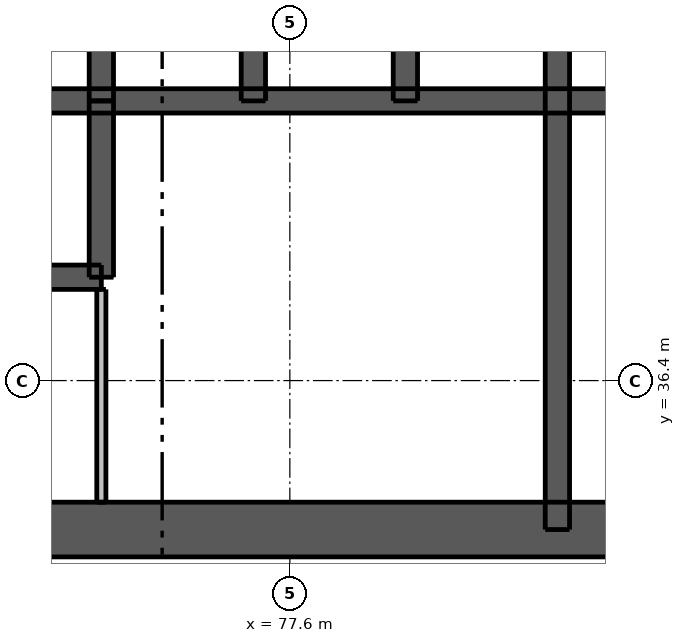
"""IFC4 building model, lengths in metres.
Left out: names, types, materials, properties, quantities, classifications, styles, units other than length and angle.
Written with IfcOpenShell. Run it as: python <this file> out.ifc"""

import sys

from ifc_helpers import new_model, si_unit, direction, frame, frame_2d, origin, place, context, subcontext, project, spatial, rectangle, extrude, element, fill, save


model = new_model("IFC4")
c1 = context("Model", 3, precision=1e-05, world=origin(), true_north=direction((0.0, 1.0)))
c2 = subcontext(c1, "Body", "Model", "MODEL_VIEW")
j1 = project(units=[si_unit("LENGTHUNIT", "METRE"), si_unit("PLANEANGLEUNIT", "RADIAN")], contexts=[c1])
p1 = place(None, origin())
s1 = spatial("IfcSite", under=j1, at=p1, CompositionType="ELEMENT")
p2 = place(p1, origin())
s2 = spatial("IfcBuilding", under=s1, at=p2, CompositionType="ELEMENT")
p3 = place(p2, frame((0.0, 0.0, 66.4)))
s3 = spatial("IfcBuildingStorey", under=s2, at=p3, CompositionType="ELEMENT", Elevation=66.4)
p4 = place(p3, frame((62.5, 33.95, 0.0), z_axis=(0.0, 0.0, 1.0), x_axis=(1.0, 0.0, 0.0)))
e1 = element("IfcWall", 1, at=p4, inside=s3, PredefinedType="SHEAR", context=c2, shape_type="SweptSolid", body=[
    extrude(rectangle(XDim=24.0, YDim=0.9, at=frame_2d((12.0, 0.0))), origin(), (0.0, 0.0, 1.0), 2.95),
])
p5 = place(p4, frame((2.05, 0.0, 0.0)))
e2 = element("IfcOpeningElement", 2, at=p5, cuts=e1, PredefinedType="OPENING", context=c2, shape_type="SweptSolid", body=[
    extrude(rectangle(XDim=1.1, YDim=2.1, at=frame_2d((0.55, 1.05))), frame((0.0, 0.46, 0.0), z_axis=(0.0, -1.0, 0.0), x_axis=(1.0, 0.0, 0.0)), (0.0, 0.0, 1.0), 0.92),
])
p6 = place(p4, frame((20.85, 0.0, 0.0)))
e3 = element("IfcOpeningElement", 3, at=p6, cuts=e1, PredefinedType="OPENING", context=c2, shape_type="SweptSolid", body=[
    extrude(rectangle(XDim=1.1, YDim=2.1, at=frame_2d((0.55, 1.05))), frame((0.0, 0.46, 0.0), z_axis=(0.0, -1.0, 0.0), x_axis=(1.0, 0.0, 0.0)), (0.0, 0.0, 1.0), 0.92),
])
p7 = place(p4, frame((8.0, 0.0, 0.0)))
e4 = element("IfcOpeningElement", 4, at=p7, cuts=e1, PredefinedType="OPENING", context=c2, shape_type="SweptSolid", body=[
    extrude(rectangle(XDim=1.1, YDim=2.1, at=frame_2d((0.55, 1.05))), frame((0.0, 0.46, 0.0), z_axis=(0.0, -1.0, 0.0), x_axis=(1.0, 0.0, 0.0)), (0.0, 0.0, 1.0), 0.92),
])
p8 = place(p4, frame((15.3, 0.0, 0.0)))
e5 = element("IfcOpeningElement", 5, at=p8, cuts=e1, PredefinedType="OPENING", context=c2, shape_type="SweptSolid", body=[
    extrude(rectangle(XDim=0.9, YDim=2.1, at=frame_2d((0.45, 1.05))), frame((0.0, 0.46, 0.0), z_axis=(0.0, -1.0, 0.0), x_axis=(1.0, 0.0, 0.0)), (0.0, 0.0, 1.0), 0.92),
])
p9 = place(p3, frame((62.95, 41.0, 0.0), z_axis=(0.0, 0.0, 1.0), x_axis=(1.0, 0.0, 0.0)))
e6 = element("IfcWall", 6, at=p9, inside=s3, PredefinedType="SHEAR", context=c2, shape_type="SweptSolid", body=[
    extrude(rectangle(XDim=23.1, YDim=0.4, at=frame_2d((11.55, 0.0))), origin(), (0.0, 0.0, 1.0), 2.95),
])
p10 = place(p3, frame((82.0, 33.95, 0.0), z_axis=(0.0, 0.0, 1.0), x_axis=(0.0, 1.0, 0.0)))
e7 = element("IfcWall", 7, at=p10, inside=s3, PredefinedType="SHEAR", context=c2, shape_type="SweptSolid", body=[
    extrude(rectangle(XDim=9.95, YDim=0.4, at=frame_2d((4.975, 0.0))), origin(), (0.0, 0.0, 1.0), 2.95),
])
for number, where, z_axis, x_axis in (
    (8, (74.5, 41.0, 0.0), (0.0, 0.0, 1.0), (0.0, 1.0, 0.0)),
    (9, (77.0, 41.0, 0.0), (0.0, 0.0, 1.0), (0.0, 1.0, 0.0)),
    (10, (79.5, 41.0, 0.0), (0.0, 0.0, 1.0), (0.0, 1.0, 0.0)),
):
    element("IfcWall", number, at=place(p3, frame(where, z_axis=z_axis, x_axis=x_axis)), inside=s3, PredefinedType="SHEAR", context=c2, shape_type="SweptSolid", body=[
        extrude(rectangle(XDim=2.9, YDim=0.4, at=frame_2d((1.45, 0.0))), origin(), (0.0, 0.0, 1.0), 2.95),
    ])
p11 = place(p3, frame((67.0, 38.1, 0.0), z_axis=(0.0, 0.0, 1.0), x_axis=(1.0, 0.0, 0.0)))
e11 = element("IfcWall", 11, at=p11, inside=s3, PredefinedType="SHEAR", context=c2, shape_type="SweptSolid", body=[
    extrude(rectangle(XDim=7.5, YDim=0.4, at=frame_2d((3.75, 0.0))), origin(), (0.0, 0.0, 1.0), 2.95),
])
p12 = place(p11, frame((0.7, 0.0, 0.0)))
e12 = element("IfcOpeningElement", 12, at=p12, cuts=e11, PredefinedType="OPENING", context=c2, shape_type="SweptSolid", body=[
    extrude(rectangle(XDim=1.1, YDim=2.1, at=frame_2d((0.55, 1.05))), frame((0.0, 0.21, 0.0), z_axis=(0.0, -1.0, 0.0), x_axis=(1.0, 0.0, 0.0)), (0.0, 0.0, 1.0), 0.42),
])
p13 = place(p11, frame((3.2, 0.0, 0.0)))
e13 = element("IfcOpeningElement", 13, at=p13, cuts=e11, PredefinedType="OPENING", context=c2, shape_type="SweptSolid", body=[
    extrude(rectangle(XDim=1.1, YDim=2.1, at=frame_2d((0.55, 1.05))), frame((0.0, 0.21, 0.0), z_axis=(0.0, -1.0, 0.0), x_axis=(1.0, 0.0, 0.0)), (0.0, 0.0, 1.0), 0.42),
])
p14 = place(p11, frame((5.65, 0.0, 0.0)))
e14 = element("IfcOpeningElement", 14, at=p14, cuts=e11, PredefinedType="OPENING", context=c2, shape_type="SweptSolid", body=[
    extrude(rectangle(XDim=1.2, YDim=2.1, at=frame_2d((0.6, 1.05))), frame((0.0, 0.21, 0.0), z_axis=(0.0, -1.0, 0.0), x_axis=(1.0, 0.0, 0.0)), (0.0, 0.0, 1.0), 0.42),
])
p15 = place(p3, frame((74.5, 38.1, 0.0), z_axis=(0.0, 0.0, 1.0), x_axis=(0.0, 1.0, 0.0)))
e15 = element("IfcWall", 15, at=p15, inside=s3, PredefinedType="SHEAR", context=c2, shape_type="SweptSolid", body=[
    extrude(rectangle(XDim=2.9, YDim=0.4, at=frame_2d((1.45, 0.0))), origin(), (0.0, 0.0, 1.0), 2.95),
])
p16 = place(p3, frame((74.5, 34.4, 0.0), z_axis=(0.0, 0.0, 1.0), x_axis=(0.0, 1.0, 0.0)))
e16 = element("IfcWall", 16, at=p16, inside=s3, PredefinedType="PLUMBINGWALL", context=c2, shape_type="SweptSolid", body=[
    extrude(rectangle(XDim=3.5, YDim=0.15, at=frame_2d((1.75, 0.0))), origin(), (0.0, 0.0, 1.0), 2.95),
])
p17 = place(p8, origin())
e17 = element("IfcDoor", 17, at=p17, inside=s3, OperationType="SINGLE_SWING_LEFT", PredefinedType="DOOR", context=c2, shape_type="SweptSolid", body=[
    extrude(rectangle(XDim=0.9, YDim=2.1, at=frame_2d((0.45, 1.05))), frame((0.0, 0.438, 0.0), z_axis=(0.0, -1.0, 0.0), x_axis=(1.0, 0.0, 0.0)), (0.0, 0.0, 1.0), 0.05),
])
fill(e5, e17)
p18 = place(p14, origin())
e18 = element("IfcDoor", 18, at=p18, inside=s3, OperationType="DOUBLE_DOOR_SLIDING", PredefinedType="DOOR", context=c2, shape_type="SweptSolid", body=[
    extrude(rectangle(XDim=1.2, YDim=2.1, at=frame_2d((0.6, 1.05))), frame((0.0, 0.025, 0.0), z_axis=(0.0, -1.0, 0.0), x_axis=(1.0, 0.0, 0.0)), (0.0, 0.0, 1.0), 0.05),
])
fill(e14, e18)
save(model, sys.argv[1])
